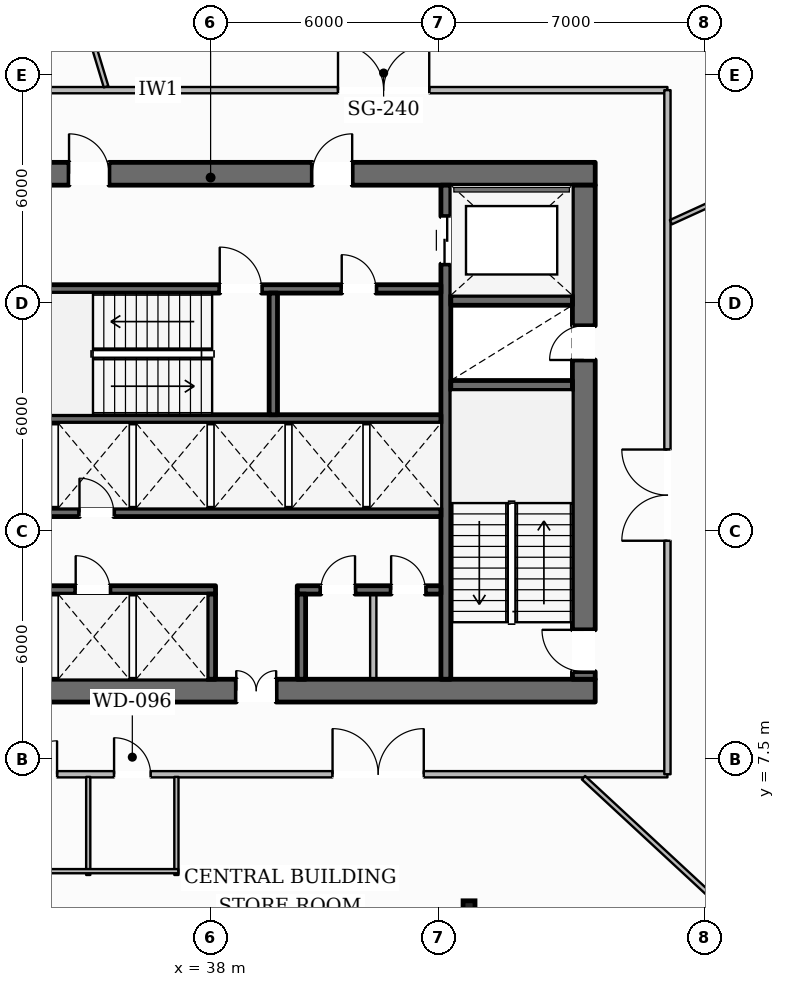
"""IFC4 building model, lengths in metres.
Left out: names, types, materials, properties, quantities, classifications, styles, units other than length and angle.
Written with IfcOpenShell. Run it as: python <this file> out.ifc"""

import sys

from ifc_helpers import new_model, si_unit, direction, frame, frame_2d, origin, origin_2d, place, context, subcontext, project, spatial, rectangle, i_section, extrude, element, fill, save


model = new_model("IFC4")
c1 = context("Model", 3, precision=1e-05, world=origin(), true_north=direction((0.0, 1.0)))
c2 = subcontext(c1, "Body", "Model", "MODEL_VIEW")
j1 = project(units=[si_unit("LENGTHUNIT", "METRE"), si_unit("PLANEANGLEUNIT", "RADIAN")], contexts=[c1])
p1 = place(None, origin())
s1 = spatial("IfcSite", under=j1, at=p1, CompositionType="ELEMENT")
p2 = place(p1, origin())
s2 = spatial("IfcBuilding", under=s1, at=p2, CompositionType="ELEMENT")
p3 = place(p2, frame((0.0, 0.0, -4.2)))
s3 = spatial("IfcBuildingStorey", under=s2, at=p3, CompositionType="ELEMENT", Elevation=-4.2)
p4 = place(p3, frame((62.878, 15.311, 0.0), z_axis=(0.0, 0.0, 1.0), x_axis=(-0.499999749417, 0.866025548458, 0.0)))
e1 = element("IfcWall", 1, at=p4, inside=s3, PredefinedType="SHEAR", context=c2, shape_type="SweptSolid", body=[
    extrude(rectangle(XDim=33.0, YDim=0.5, at=frame_2d((16.5, 0.0))), origin(), (0.0, 0.0, 1.0), 3.94),
])
p5 = place(p3, frame((27.88, 9.3, 0.0), z_axis=(0.0, 0.0, 1.0), x_axis=(1.0, 0.0, 0.0)))
e2 = element("IfcWall", 2, at=p5, inside=s3, PredefinedType="SOLIDWALL", context=c2, shape_type="SweptSolid", body=[
    extrude(rectangle(XDim=20.24, YDim=0.6, at=frame_2d((10.12, 0.0))), origin(), (0.0, 0.0, 1.0), 3.94),
])
p6 = place(p5, frame((10.795, 0.0, 0.0)))
e3 = element("IfcOpeningElement", 3, at=p6, cuts=e2, PredefinedType="OPENING", context=c2, shape_type="SweptSolid", body=[
    extrude(rectangle(XDim=1.05, YDim=2.15, at=frame_2d((0.525, 1.075))), frame((0.0, 0.31, 0.0), z_axis=(0.0, -1.0, 0.0), x_axis=(1.0, 0.0, 0.0)), (0.0, 0.0, 1.0), 0.62),
])
p7 = place(p3, frame((27.88, 22.9, 0.0), z_axis=(0.0, 0.0, 1.0), x_axis=(1.0, 0.0, 0.0)))
e4 = element("IfcWall", 4, at=p7, inside=s3, PredefinedType="SOLIDWALL", context=c2, shape_type="SweptSolid", body=[
    extrude(rectangle(XDim=20.24, YDim=0.6, at=frame_2d((10.12, 0.0))), origin(), (0.0, 0.0, 1.0), 3.94),
])
p8 = place(p7, frame((6.395, 0.0, 0.0)))
e5 = element("IfcOpeningElement", 5, at=p8, cuts=e4, PredefinedType="OPENING", context=c2, shape_type="SweptSolid", body=[
    extrude(rectangle(XDim=1.05, YDim=2.15, at=frame_2d((0.525, 1.075))), frame((0.0, 0.31, 0.0), z_axis=(0.0, -1.0, 0.0), x_axis=(1.0, 0.0, 0.0)), (0.0, 0.0, 1.0), 0.62),
])
p9 = place(p7, frame((12.795, 0.0, 0.0)))
e6 = element("IfcOpeningElement", 6, at=p9, cuts=e4, PredefinedType="OPENING", context=c2, shape_type="SweptSolid", body=[
    extrude(rectangle(XDim=1.05, YDim=2.15, at=frame_2d((0.525, 1.075))), frame((0.0, 0.31, 0.0), z_axis=(0.0, -1.0, 0.0), x_axis=(1.0, 0.0, 0.0)), (0.0, 0.0, 1.0), 0.62),
])
p10 = place(p3, frame((47.82, 9.6, 0.0), z_axis=(0.0, 0.0, 1.0), x_axis=(0.0, 1.0, 0.0)))
e7 = element("IfcWall", 7, at=p10, inside=s3, PredefinedType="SOLIDWALL", context=c2, shape_type="SweptSolid", body=[
    extrude(rectangle(XDim=13.0, YDim=0.6, at=frame_2d((6.5, 0.0))), origin(), (0.0, 0.0, 1.0), 3.94),
])
p11 = place(p10, frame((0.2, 0.0, 0.0)))
e8 = element("IfcOpeningElement", 8, at=p11, cuts=e7, PredefinedType="OPENING", context=c2, shape_type="SweptSolid", body=[
    extrude(rectangle(XDim=1.1, YDim=2.15, at=frame_2d((0.55, 1.075))), frame((0.0, 0.31, 0.0), z_axis=(0.0, -1.0, 0.0), x_axis=(1.0, 0.0, 0.0)), (0.0, 0.0, 1.0), 0.62),
])
p12 = place(p10, frame((8.4, 0.0, 0.0)))
e9 = element("IfcOpeningElement", 9, at=p12, cuts=e7, PredefinedType="OPENING", context=c2, shape_type="SweptSolid", body=[
    extrude(rectangle(XDim=0.9, YDim=2.1, at=frame_2d((0.45, 1.05))), frame((0.0, 0.31, 0.0), z_axis=(0.0, -1.0, 0.0), x_axis=(1.0, 0.0, 0.0)), (0.0, 0.0, 1.0), 0.62),
])
p13 = place(p3, frame((44.19, 9.6, 0.0), z_axis=(0.0, 0.0, 1.0), x_axis=(0.0, 1.0, 0.0)))
e10 = element("IfcWall", 10, at=p13, inside=s3, PredefinedType="SHEAR", context=c2, shape_type="SweptSolid", body=[
    extrude(rectangle(XDim=13.0, YDim=0.26, at=frame_2d((6.5, 0.0))), origin(), (0.0, 0.0, 1.0), 3.94),
])
p14 = place(p13, frame((10.925, 0.0, 0.0)))
e11 = element("IfcOpeningElement", 11, at=p14, cuts=e10, PredefinedType="OPENING", context=c2, shape_type="SweptSolid", body=[
    extrude(rectangle(XDim=1.25, YDim=2.25, at=frame_2d((0.625, 1.125))), frame((0.0, 0.14, 0.0), z_axis=(0.0, -1.0, 0.0), x_axis=(1.0, 0.0, 0.0)), (0.0, 0.0, 1.0), 0.28),
])
for number, where, z_axis, x_axis in (
    (12, (44.32, 17.33, 0.0), (0.0, 0.0, 1.0), (1.0, 0.0, 0.0)),
    (13, (44.32, 19.57, 0.0), (0.0, 0.0, 1.0), (1.0, 0.0, 0.0)),
):
    element("IfcWall", number, at=place(p3, frame(where, z_axis=z_axis, x_axis=x_axis)), inside=s3, PredefinedType="SHEAR", context=c2, shape_type="SweptSolid", body=[
        extrude(rectangle(XDim=3.2, YDim=0.26, at=frame_2d((1.6, 0.0))), origin(), (0.0, 0.0, 1.0), 3.94),
    ])
p15 = place(p3, frame((31.94, 19.87, 0.0), z_axis=(0.0, 0.0, 1.0), x_axis=(1.0, 0.0, 0.0)))
e14 = element("IfcWall", 14, at=p15, inside=s3, PredefinedType="SOLIDWALL", context=c2, shape_type="SweptSolid", body=[
    extrude(rectangle(XDim=12.12, YDim=0.22, at=frame_2d((6.06, 0.0))), origin(), (0.0, 0.0, 1.0), 3.94),
])
p16 = place(p15, frame((6.3, 0.0, 0.0)))
e15 = element("IfcOpeningElement", 15, at=p16, cuts=e14, PredefinedType="OPENING", context=c2, shape_type="SweptSolid", body=[
    extrude(rectangle(XDim=1.1, YDim=2.15, at=frame_2d((0.55, 1.075))), frame((0.0, 0.12, 0.0), z_axis=(0.0, -1.0, 0.0), x_axis=(1.0, 0.0, 0.0)), (0.0, 0.0, 1.0), 0.24),
])
p17 = place(p15, frame((9.51, 0.0, 0.0)))
e16 = element("IfcOpeningElement", 16, at=p17, cuts=e14, PredefinedType="OPENING", context=c2, shape_type="SweptSolid", body=[
    extrude(rectangle(XDim=0.9, YDim=2.1, at=frame_2d((0.45, 1.05))), frame((0.0, 0.12, 0.0), z_axis=(0.0, -1.0, 0.0), x_axis=(1.0, 0.0, 0.0)), (0.0, 0.0, 1.0), 0.24),
])
p18 = place(p3, frame((31.94, 16.45, 0.0), z_axis=(0.0, 0.0, 1.0), x_axis=(1.0, 0.0, 0.0)))
e17 = element("IfcWall", 17, at=p18, inside=s3, PredefinedType="SOLIDWALL", context=c2, shape_type="SweptSolid", body=[
    extrude(rectangle(XDim=12.12, YDim=0.22, at=frame_2d((6.06, 0.0))), origin(), (0.0, 0.0, 1.0), 3.94),
])
p19 = place(p3, frame((39.65, 16.56, 0.0), z_axis=(0.0, 0.0, 1.0), x_axis=(0.0, 1.0, 0.0)))
e18 = element("IfcWall", 18, at=p19, inside=s3, PredefinedType="SOLIDWALL", context=c2, shape_type="SweptSolid", body=[
    extrude(rectangle(XDim=3.2, YDim=0.22, at=frame_2d((1.6, 0.0))), origin(), (0.0, 0.0, 1.0), 3.94),
])
p20 = place(p3, frame((31.94, 13.99, 0.0), z_axis=(0.0, 0.0, 1.0), x_axis=(1.0, 0.0, 0.0)))
e19 = element("IfcWall", 19, at=p20, inside=s3, PredefinedType="SOLIDWALL", context=c2, shape_type="SweptSolid", body=[
    extrude(rectangle(XDim=12.12, YDim=0.22, at=frame_2d((6.06, 0.0))), origin(), (0.0, 0.0, 1.0), 3.94),
])
p21 = place(p20, frame((2.61, 0.0, 0.0)))
e20 = element("IfcOpeningElement", 20, at=p21, cuts=e19, PredefinedType="OPENING", context=c2, shape_type="SweptSolid", body=[
    extrude(rectangle(XDim=0.9, YDim=2.1, at=frame_2d((0.45, 1.05))), frame((0.0, 0.12, 0.0), z_axis=(0.0, -1.0, 0.0), x_axis=(1.0, 0.0, 0.0)), (0.0, 0.0, 1.0), 0.24),
])
p22 = place(p3, frame((31.94, 11.95, 0.0), z_axis=(0.0, 0.0, 1.0), x_axis=(1.0, 0.0, 0.0)))
e21 = element("IfcWall", 21, at=p22, inside=s3, PredefinedType="SOLIDWALL", context=c2, shape_type="SweptSolid", body=[
    extrude(rectangle(XDim=6.19, YDim=0.22, at=frame_2d((3.095, 0.0))), origin(), (0.0, 0.0, 1.0), 3.94),
])
p23 = place(p22, frame((2.51, 0.0, 0.0)))
e22 = element("IfcOpeningElement", 22, at=p23, cuts=e21, PredefinedType="OPENING", context=c2, shape_type="SweptSolid", body=[
    extrude(rectangle(XDim=0.9, YDim=2.1, at=frame_2d((0.45, 1.05))), frame((0.0, 0.12, 0.0), z_axis=(0.0, -1.0, 0.0), x_axis=(1.0, 0.0, 0.0)), (0.0, 0.0, 1.0), 0.24),
])
p24 = place(p3, frame((40.28, 11.95, 0.0), z_axis=(0.0, 0.0, 1.0), x_axis=(1.0, 0.0, 0.0)))
e23 = element("IfcWall", 23, at=p24, inside=s3, PredefinedType="SOLIDWALL", context=c2, shape_type="SweptSolid", body=[
    extrude(rectangle(XDim=3.78, YDim=0.22, at=frame_2d((1.89, 0.0))), origin(), (0.0, 0.0, 1.0), 3.94),
])
p25 = place(p24, frame((0.62, 0.0, 0.0)))
e24 = element("IfcOpeningElement", 24, at=p25, cuts=e23, PredefinedType="OPENING", context=c2, shape_type="SweptSolid", body=[
    extrude(rectangle(XDim=0.9, YDim=2.1, at=frame_2d((0.45, 1.05))), frame((0.0, 0.12, 0.0), z_axis=(0.0, -1.0, 0.0), x_axis=(1.0, 0.0, 0.0)), (0.0, 0.0, 1.0), 0.24),
])
p26 = place(p24, frame((2.47, 0.0, 0.0)))
e25 = element("IfcOpeningElement", 25, at=p26, cuts=e23, PredefinedType="OPENING", context=c2, shape_type="SweptSolid", body=[
    extrude(rectangle(XDim=0.9, YDim=2.1, at=frame_2d((0.45, 1.05))), frame((0.0, 0.12, 0.0), z_axis=(0.0, -1.0, 0.0), x_axis=(1.0, 0.0, 0.0)), (0.0, 0.0, 1.0), 0.24),
])
for number, where, z_axis, x_axis in (
    (26, (38.02, 9.6, 0.0), (0.0, 0.0, 1.0), (0.0, 1.0, 0.0)),
    (27, (40.39, 9.6, 0.0), (0.0, 0.0, 1.0), (0.0, 1.0, 0.0)),
):
    element("IfcWall", number, at=place(p3, frame(where, z_axis=z_axis, x_axis=x_axis)), inside=s3, PredefinedType="SOLIDWALL", context=c2, shape_type="SweptSolid", body=[
        extrude(rectangle(XDim=2.24, YDim=0.22, at=frame_2d((1.12, 0.0))), origin(), (0.0, 0.0, 1.0), 3.94),
    ])
p27 = place(p3, frame((44.8, 3.6, 0.0), z_axis=(0.0, 0.0, 1.0), x_axis=(1.0, 0.0, 0.0)))
e28 = element("IfcColumn", 28, at=p27, inside=s3, PredefinedType="COLUMN", context=c2, shape_type="SweptSolid", body=[
    extrude(i_section(OverallWidth=0.314, OverallDepth=0.34, WebThickness=0.019, FlangeThickness=0.031, at=origin_2d()), origin(), (0.0, 0.0, 1.0), 3.94),
])
p28 = place(p3, frame((42.28, 9.6, 0.0), z_axis=(0.0, 0.0, 1.0), x_axis=(0.0, 1.0, 0.0)))
e29 = element("IfcWall", 29, at=p28, inside=s3, PredefinedType="PARTITIONING", context=c2, shape_type="SweptSolid", body=[
    extrude(rectangle(XDim=2.24, YDim=0.165, at=frame_2d((1.12, 0.0))), origin(), (0.0, 0.0, 1.0), 3.94),
])
p29 = place(p3, frame((25.98, 25.1, 0.0), z_axis=(0.0, 0.0, 1.0), x_axis=(1.0, 0.0, 0.0)))
e30 = element("IfcWall", 30, at=p29, inside=s3, PredefinedType="PARTITIONING", context=c2, shape_type="SweptSolid", body=[
    extrude(rectangle(XDim=24.04, YDim=0.165, at=frame_2d((12.02, 0.0))), origin(), (0.0, 0.0, 1.0), 3.94),
])
p30 = place(p29, frame((15.372, 0.0, 0.0)))
e31 = element("IfcOpeningElement", 31, at=p30, cuts=e30, PredefinedType="OPENING", context=c2, shape_type="SweptSolid", body=[
    extrude(rectangle(XDim=2.4, YDim=2.4, at=frame_2d((1.2, 1.2))), frame((0.0, 0.093, 0.0), z_axis=(0.0, -1.0, 0.0), x_axis=(1.0, 0.0, 0.0)), (0.0, 0.0, 1.0), 0.185),
])
p31 = place(p29, frame((3.517, 0.0, 0.0)))
e32 = element("IfcOpeningElement", 32, at=p31, cuts=e30, PredefinedType="OPENING", context=c2, shape_type="SweptSolid", body=[
    extrude(rectangle(XDim=2.4, YDim=2.4, at=frame_2d((1.2, 1.2))), frame((0.0, 0.093, 0.0), z_axis=(0.0, -1.0, 0.0), x_axis=(1.0, 0.0, 0.0)), (0.0, 0.0, 1.0), 0.185),
])
p32 = place(p3, frame((25.98, 7.1, 0.0), z_axis=(0.0, 0.0, 1.0), x_axis=(1.0, 0.0, 0.0)))
e33 = element("IfcWall", 33, at=p32, inside=s3, PredefinedType="PARTITIONING", context=c2, shape_type="SweptSolid", body=[
    extrude(rectangle(XDim=24.04, YDim=0.165, at=frame_2d((12.02, 0.0))), origin(), (0.0, 0.0, 1.0), 3.94),
])
p33 = place(p32, frame((4.58, 0.0, 0.0)))
e34 = element("IfcOpeningElement", 34, at=p33, cuts=e33, PredefinedType="OPENING", context=c2, shape_type="SweptSolid", body=[
    extrude(rectangle(XDim=0.88, YDim=2.1, at=frame_2d((0.44, 1.05))), frame((0.0, 0.093, 0.0), z_axis=(0.0, -1.0, 0.0), x_axis=(1.0, 0.0, 0.0)), (0.0, 0.0, 1.0), 0.185),
])
p34 = place(p32, frame((7.1, 0.0, 0.0)))
e35 = element("IfcOpeningElement", 35, at=p34, cuts=e33, PredefinedType="OPENING", context=c2, shape_type="SweptSolid", body=[
    extrude(rectangle(XDim=0.88, YDim=2.1, at=frame_2d((0.44, 1.05))), frame((0.0, 0.093, 0.0), z_axis=(0.0, -1.0, 0.0), x_axis=(1.0, 0.0, 0.0)), (0.0, 0.0, 1.0), 0.185),
])
p35 = place(p32, frame((9.48, 0.0, 0.0)))
e36 = element("IfcOpeningElement", 36, at=p35, cuts=e33, PredefinedType="OPENING", context=c2, shape_type="SweptSolid", body=[
    extrude(rectangle(XDim=0.96, YDim=2.1, at=frame_2d((0.48, 1.05))), frame((0.0, 0.093, 0.0), z_axis=(0.0, -1.0, 0.0), x_axis=(1.0, 0.0, 0.0)), (0.0, 0.0, 1.0), 0.185),
])
p36 = place(p32, frame((15.229, 0.0, 0.0)))
e37 = element("IfcOpeningElement", 37, at=p36, cuts=e33, PredefinedType="OPENING", context=c2, shape_type="SweptSolid", body=[
    extrude(rectangle(XDim=2.4, YDim=2.4, at=frame_2d((1.2, 1.2))), frame((0.0, 0.093, 0.0), z_axis=(0.0, -1.0, 0.0), x_axis=(1.0, 0.0, 0.0)), (0.0, 0.0, 1.0), 0.185),
])
p37 = place(p3, frame((50.02, 7.1, 0.0), z_axis=(0.0, 0.0, 1.0), x_axis=(0.0, 1.0, 0.0)))
e38 = element("IfcWall", 38, at=p37, inside=s3, PredefinedType="PARTITIONING", context=c2, shape_type="SweptSolid", body=[
    extrude(rectangle(XDim=18.0, YDim=0.165, at=frame_2d((9.0, 0.0))), origin(), (0.0, 0.0, 1.0), 3.628),
])
p38 = place(p37, frame((6.144, 0.0, 0.0)))
e39 = element("IfcOpeningElement", 39, at=p38, cuts=e38, PredefinedType="OPENING", context=c2, shape_type="SweptSolid", body=[
    extrude(rectangle(XDim=2.4, YDim=2.4, at=frame_2d((1.2, 1.2))), frame((0.0, 0.093, 0.0), z_axis=(0.0, -1.0, 0.0), x_axis=(1.0, 0.0, 0.0)), (0.0, 0.0, 1.0), 0.185),
])
for number, where, z_axis, x_axis in (
    (40, (34.78, 4.45, 0.0), (0.0, 0.0, 1.0), (0.0, 1.0, 0.0)),
    (41, (37.1, 4.45, 0.0), (0.0, 0.0, 1.0), (0.0, 1.0, 0.0)),
):
    element("IfcWall", number, at=place(p3, frame(where, z_axis=z_axis, x_axis=x_axis)), inside=s3, PredefinedType="PLUMBINGWALL", context=c2, shape_type="SweptSolid", body=[
        extrude(rectangle(XDim=2.58, YDim=0.11, at=frame_2d((1.29, 0.0))), origin(), (0.0, 0.0, 1.0), 3.94),
    ])
p39 = place(p3, frame((29.69, 4.55, 0.0), z_axis=(0.0, 0.0, 1.0), x_axis=(1.0, 0.0, 0.0)))
e42 = element("IfcWall", 42, at=p39, inside=s3, PredefinedType="PLUMBINGWALL", context=c2, shape_type="SweptSolid", body=[
    extrude(rectangle(XDim=7.46, YDim=0.11, at=frame_2d((3.73, 0.0))), origin(), (0.0, 0.0, 1.0), 3.628),
])
p40 = place(p3, frame((50.111, 21.626, 0.0), z_axis=(0.0, 0.0, 1.0), x_axis=(0.909768462503, 0.415116061643, 0.0)))
e43 = element("IfcWall", 43, at=p40, inside=s3, PredefinedType="PARTITIONING", context=c2, shape_type="SweptSolid", body=[
    extrude(rectangle(XDim=7.674, YDim=0.125, at=frame_2d((3.837, 0.0))), origin(), (0.0, 0.0, 1.0), 3.94),
])
p41 = place(p3, frame((35.249, 25.19, 0.0), z_axis=(0.0, 0.0, 1.0), x_axis=(-0.289619538285, 0.957141851057, 0.0)))
e44 = element("IfcWall", 44, at=p41, inside=s3, PredefinedType="PARTITIONING", context=c2, shape_type="SweptSolid", body=[
    extrude(rectangle(XDim=18.362, YDim=0.125, at=frame_2d((9.181, 0.0))), origin(), (0.0, 0.0, 1.0), 3.94),
])
p42 = place(p3, frame((47.811, 7.01, 0.0), z_axis=(0.0, 0.0, 1.0), x_axis=(0.733527128647, -0.679660173571, 0.0)))
e45 = element("IfcWall", 45, at=p42, inside=s3, PredefinedType="PARTITIONING", context=c2, shape_type="SweptSolid", body=[
    extrude(rectangle(XDim=7.664, YDim=0.125, at=frame_2d((3.832, 0.0))), origin(), (0.0, 0.0, 1.0), 3.407),
])
p43 = place(p11, origin())
e46 = element("IfcDoor", 46, at=p43, inside=s3, OperationType="SINGLE_SWING_RIGHT", PredefinedType="DOOR", context=c2, shape_type="SweptSolid", body=[
    extrude(rectangle(XDim=1.1, YDim=2.15, at=frame_2d((0.55, 1.075))), frame((0.0, 0.025, 0.0), z_axis=(0.0, -1.0, 0.0), x_axis=(1.0, 0.0, 0.0)), (0.0, 0.0, 1.0), 0.05),
])
fill(e8, e46)
p44 = place(p16, origin())
e47 = element("IfcDoor", 47, at=p44, inside=s3, OperationType="SINGLE_SWING_LEFT", PredefinedType="DOOR", context=c2, shape_type="SweptSolid", body=[
    extrude(rectangle(XDim=1.1, YDim=2.15, at=frame_2d((0.55, 1.075))), frame((0.0, 0.025, 0.0), z_axis=(0.0, -1.0, 0.0), x_axis=(1.0, 0.0, 0.0)), (0.0, 0.0, 1.0), 0.05),
])
fill(e15, e47)
p45 = place(p12, origin())
e48 = element("IfcDoor", 48, at=p45, inside=s3, OperationType="SINGLE_SWING_LEFT", PredefinedType="DOOR", context=c2, shape_type="SweptSolid", body=[
    extrude(rectangle(XDim=0.9, YDim=2.1, at=frame_2d((0.45, 1.05))), frame((0.0, 0.025, 0.0), z_axis=(0.0, -1.0, 0.0), x_axis=(1.0, 0.0, 0.0)), (0.0, 0.0, 1.0), 0.05),
])
fill(e9, e48)
p46 = place(p8, origin())
e49 = element("IfcDoor", 49, at=p46, inside=s3, OperationType="SINGLE_SWING_LEFT", PredefinedType="DOOR", context=c2, shape_type="SweptSolid", body=[
    extrude(rectangle(XDim=1.05, YDim=2.15, at=frame_2d((0.525, 1.075))), frame((0.0, 0.025, 0.0), z_axis=(0.0, -1.0, 0.0), x_axis=(1.0, 0.0, 0.0)), (0.0, 0.0, 1.0), 0.05),
])
fill(e5, e49)
p47 = place(p9, origin())
e50 = element("IfcDoor", 50, at=p47, inside=s3, OperationType="SINGLE_SWING_RIGHT", PredefinedType="DOOR", context=c2, shape_type="SweptSolid", body=[
    extrude(rectangle(XDim=1.05, YDim=2.15, at=frame_2d((0.525, 1.075))), frame((0.0, 0.025, 0.0), z_axis=(0.0, -1.0, 0.0), x_axis=(1.0, 0.0, 0.0)), (0.0, 0.0, 1.0), 0.05),
])
fill(e6, e50)
p48 = place(p14, origin())
e51 = element("IfcDoor", 51, at=p48, inside=s3, OperationType="DOUBLE_DOOR_SLIDING", PredefinedType="DOOR", context=c2, shape_type="SweptSolid", body=[
    extrude(rectangle(XDim=1.25, YDim=2.25, at=frame_2d((0.625, 1.125))), frame((0.0, 0.025, 0.0), z_axis=(0.0, -1.0, 0.0), x_axis=(1.0, 0.0, 0.0)), (0.0, 0.0, 1.0), 0.05),
])
fill(e11, e51)
p49 = place(p6, origin())
e52 = element("IfcDoor", 52, at=p49, inside=s3, OperationType="DOUBLE_DOOR_SINGLE_SWING", PredefinedType="DOOR", context=c2, shape_type="SweptSolid", body=[
    extrude(rectangle(XDim=1.05, YDim=2.15, at=frame_2d((0.525, 1.075))), frame((0.0, 0.025, 0.0), z_axis=(0.0, -1.0, 0.0), x_axis=(1.0, 0.0, 0.0)), (0.0, 0.0, 1.0), 0.05),
])
fill(e3, e52)
p50 = place(p23, origin())
e53 = element("IfcDoor", 53, at=p50, inside=s3, OperationType="SINGLE_SWING_LEFT", PredefinedType="DOOR", context=c2, shape_type="SweptSolid", body=[
    extrude(rectangle(XDim=0.9, YDim=2.1, at=frame_2d((0.45, 1.05))), frame((0.0, 0.025, 0.0), z_axis=(0.0, -1.0, 0.0), x_axis=(1.0, 0.0, 0.0)), (0.0, 0.0, 1.0), 0.05),
])
fill(e22, e53)
p51 = place(p21, origin())
e54 = element("IfcDoor", 54, at=p51, inside=s3, OperationType="SINGLE_SWING_LEFT", PredefinedType="DOOR", context=c2, shape_type="SweptSolid", body=[
    extrude(rectangle(XDim=0.9, YDim=2.1, at=frame_2d((0.45, 1.05))), frame((0.0, 0.025, 0.0), z_axis=(0.0, -1.0, 0.0), x_axis=(1.0, 0.0, 0.0)), (0.0, 0.0, 1.0), 0.05),
])
fill(e20, e54)
p52 = place(p17, origin())
e55 = element("IfcDoor", 55, at=p52, inside=s3, OperationType="SINGLE_SWING_LEFT", PredefinedType="DOOR", context=c2, shape_type="SweptSolid", body=[
    extrude(rectangle(XDim=0.9, YDim=2.1, at=frame_2d((0.45, 1.05))), frame((0.0, 0.025, 0.0), z_axis=(0.0, -1.0, 0.0), x_axis=(1.0, 0.0, 0.0)), (0.0, 0.0, 1.0), 0.05),
])
fill(e16, e55)
p53 = place(p25, origin())
e56 = element("IfcDoor", 56, at=p53, inside=s3, OperationType="SINGLE_SWING_RIGHT", PredefinedType="DOOR", context=c2, shape_type="SweptSolid", body=[
    extrude(rectangle(XDim=0.9, YDim=2.1, at=frame_2d((0.45, 1.05))), frame((0.0, 0.025, 0.0), z_axis=(0.0, -1.0, 0.0), x_axis=(1.0, 0.0, 0.0)), (0.0, 0.0, 1.0), 0.05),
])
fill(e24, e56)
p54 = place(p26, origin())
e57 = element("IfcDoor", 57, at=p54, inside=s3, OperationType="SINGLE_SWING_LEFT", PredefinedType="DOOR", context=c2, shape_type="SweptSolid", body=[
    extrude(rectangle(XDim=0.9, YDim=2.1, at=frame_2d((0.45, 1.05))), frame((0.0, 0.025, 0.0), z_axis=(0.0, -1.0, 0.0), x_axis=(1.0, 0.0, 0.0)), (0.0, 0.0, 1.0), 0.05),
])
fill(e25, e57)
p55 = place(p34, origin())
e58 = element("IfcDoor", 58, at=p55, inside=s3, OperationType="SINGLE_SWING_RIGHT", PredefinedType="DOOR", context=c2, shape_type="SweptSolid", body=[
    extrude(rectangle(XDim=0.88, YDim=2.1, at=frame_2d((0.44, 1.05))), frame((0.0, 0.025, 0.0), z_axis=(0.0, -1.0, 0.0), x_axis=(1.0, 0.0, 0.0)), (0.0, 0.0, 1.0), 0.05),
])
fill(e35, e58)
p56 = place(p35, origin())
e59 = element("IfcDoor", 59, at=p56, inside=s3, OperationType="SINGLE_SWING_LEFT", PredefinedType="DOOR", context=c2, shape_type="SweptSolid", body=[
    extrude(rectangle(XDim=0.96, YDim=2.1, at=frame_2d((0.48, 1.05))), frame((0.0, 0.025, 0.0), z_axis=(0.0, -1.0, 0.0), x_axis=(1.0, 0.0, 0.0)), (0.0, 0.0, 1.0), 0.05),
])
fill(e36, e59)
p57 = place(p30, origin())
e60 = element("IfcDoor", 60, at=p57, inside=s3, OperationType="DOUBLE_DOOR_SINGLE_SWING", PredefinedType="GATE", context=c2, shape_type="SweptSolid", body=[
    extrude(rectangle(XDim=2.4, YDim=2.4, at=frame_2d((1.2, 1.2))), frame((0.0, 0.025, 0.0), z_axis=(0.0, -1.0, 0.0), x_axis=(1.0, 0.0, 0.0)), (0.0, 0.0, 1.0), 0.05),
])
fill(e31, e60)
p58 = place(p36, origin())
e61 = element("IfcDoor", 61, at=p58, inside=s3, OperationType="DOUBLE_DOOR_SINGLE_SWING", PredefinedType="GATE", context=c2, shape_type="SweptSolid", body=[
    extrude(rectangle(XDim=2.4, YDim=2.4, at=frame_2d((1.2, 1.2))), frame((0.0, 0.025, 0.0), z_axis=(0.0, -1.0, 0.0), x_axis=(1.0, 0.0, 0.0)), (0.0, 0.0, 1.0), 0.05),
])
fill(e37, e61)
p59 = place(p38, origin())
e62 = element("IfcDoor", 62, at=p59, inside=s3, OperationType="DOUBLE_DOOR_SINGLE_SWING", PredefinedType="GATE", context=c2, shape_type="SweptSolid", body=[
    extrude(rectangle(XDim=2.4, YDim=2.4, at=frame_2d((1.2, 1.2))), frame((0.0, 0.025, 0.0), z_axis=(0.0, -1.0, 0.0), x_axis=(1.0, 0.0, 0.0)), (0.0, 0.0, 1.0), 0.05),
])
fill(e39, e62)
save(model, sys.argv[1])
